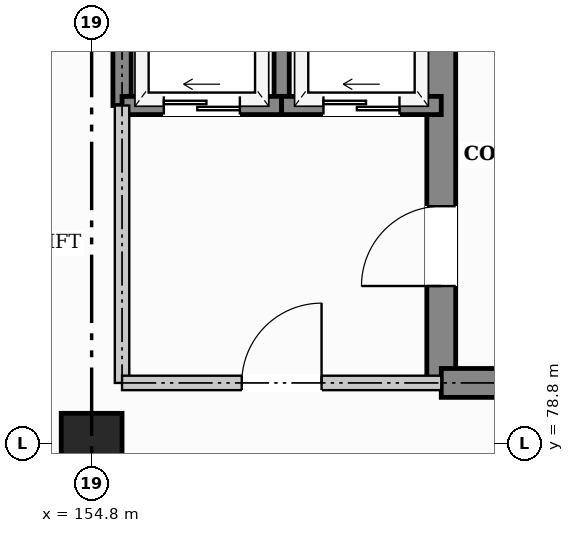
"""IFC4 building model, lengths in metres.
Left out: names, types, materials, properties, quantities, classifications, styles, units other than length and angle.
Written with IfcOpenShell. Run it as: python <this file> out.ifc"""

import sys

from ifc_helpers import new_model, si_unit, direction, frame, frame_2d, origin, origin_2d, place, context, subcontext, project, spatial, rectangle, extrude, element, fill, save


model = new_model("IFC4")
c1 = context("Model", 3, precision=1e-05, world=origin(), true_north=direction((0.0, 1.0)))
c2 = subcontext(c1, "Body", "Model", "MODEL_VIEW")
j1 = project(units=[si_unit("LENGTHUNIT", "METRE"), si_unit("PLANEANGLEUNIT", "RADIAN")], contexts=[c1])
p1 = place(None, origin())
s1 = spatial("IfcSite", under=j1, at=p1, CompositionType="ELEMENT")
p2 = place(p1, origin())
s2 = spatial("IfcBuilding", under=s1, at=p2, CompositionType="ELEMENT")
p3 = place(p2, frame((0.0, 0.0, 9.6)))
s3 = spatial("IfcBuildingStorey", under=s2, at=p3, CompositionType="ELEMENT", Elevation=9.6)
p4 = place(p3, frame((154.8, 78.8, 0.0), z_axis=(0.0, 0.0, 1.0), x_axis=(1.0, 0.0, 0.0)))
e1 = element("IfcColumn", 1, at=p4, inside=s3, PredefinedType="COLUMN", context=c2, shape_type="SweptSolid", body=[
    extrude(rectangle(XDim=0.8, YDim=0.8, at=origin_2d()), origin(), (0.0, 0.0, 1.0), 3.6),
])
p5 = place(p3, frame((159.4, 79.6, 0.0), z_axis=(0.0, 0.0, 1.0), x_axis=(0.0, 1.0, 0.0)))
e2 = element("IfcWall", 2, at=p5, inside=s3, PredefinedType="SHEAR", context=c2, shape_type="SweptSolid", body=[
    extrude(rectangle(XDim=6.0, YDim=0.38, at=frame_2d((3.0, 0.0))), origin(), (0.0, 0.0, 1.0), 3.32),
])
p6 = place(p5, frame((1.275, 0.0, 0.0)))
e3 = element("IfcOpeningElement", 3, at=p6, cuts=e2, PredefinedType="OPENING", context=c2, shape_type="SweptSolid", body=[
    extrude(rectangle(XDim=1.05, YDim=2.15, at=frame_2d((0.525, 1.075))), frame((0.0, 0.2, 0.0), z_axis=(0.0, -1.0, 0.0), x_axis=(1.0, 0.0, 0.0)), (0.0, 0.0, 1.0), 0.4),
])
p7 = place(p3, frame((159.4, 79.6, 0.0), z_axis=(0.0, 0.0, 1.0), x_axis=(1.0, 0.0, 0.0)))
e4 = element("IfcWall", 4, at=p7, inside=s3, PredefinedType="SHEAR", context=c2, shape_type="SweptSolid", body=[
    extrude(rectangle(XDim=7.0, YDim=0.38, at=frame_2d((3.5, 0.0))), origin(), (0.0, 0.0, 1.0), 3.32),
])
p8 = place(p3, frame((155.2, 83.25, 0.0), z_axis=(0.0, 0.0, 1.0), x_axis=(0.0, 1.0, 0.0)))
e5 = element("IfcWall", 5, at=p8, inside=s3, PredefinedType="SHEAR", context=c2, shape_type="SweptSolid", body=[
    extrude(rectangle(XDim=2.35, YDim=0.24, at=frame_2d((1.175, 0.0))), origin(), (0.0, 0.0, 1.0), 3.32),
])
p9 = place(p3, frame((157.3, 83.25, 0.0), z_axis=(0.0, 0.0, 1.0), x_axis=(0.0, 1.0, 0.0)))
e6 = element("IfcWall", 6, at=p9, inside=s3, PredefinedType="SHEAR", context=c2, shape_type="SweptSolid", body=[
    extrude(rectangle(XDim=2.35, YDim=0.2, at=frame_2d((1.175, 0.0))), origin(), (0.0, 0.0, 1.0), 3.32),
])
p10 = place(p3, frame((155.2, 83.25, 0.0), z_axis=(0.0, 0.0, 1.0), x_axis=(1.0, 0.0, 0.0)))
e7 = element("IfcWall", 7, at=p10, inside=s3, PredefinedType="SHEAR", context=c2, shape_type="SweptSolid", body=[
    extrude(rectangle(XDim=2.1, YDim=0.24, at=frame_2d((1.05, 0.0))), origin(), (0.0, 0.0, 1.0), 3.32),
])
p11 = place(p10, frame((0.55, 0.0, 0.0)))
e8 = element("IfcOpeningElement", 8, at=p11, cuts=e7, PredefinedType="OPENING", context=c2, shape_type="SweptSolid", body=[
    extrude(rectangle(XDim=1.0, YDim=2.1, at=frame_2d((0.5, 1.05))), frame((0.0, 0.13, 0.0), z_axis=(0.0, -1.0, 0.0), x_axis=(1.0, 0.0, 0.0)), (0.0, 0.0, 1.0), 0.26),
])
p12 = place(p3, frame((157.3, 83.25, 0.0), z_axis=(0.0, 0.0, 1.0), x_axis=(1.0, 0.0, 0.0)))
e9 = element("IfcWall", 9, at=p12, inside=s3, PredefinedType="SHEAR", context=c2, shape_type="SweptSolid", body=[
    extrude(rectangle(XDim=2.1, YDim=0.24, at=frame_2d((1.05, 0.0))), origin(), (0.0, 0.0, 1.0), 3.32),
])
p13 = place(p12, frame((0.55, 0.0, 0.0)))
e10 = element("IfcOpeningElement", 10, at=p13, cuts=e9, PredefinedType="OPENING", context=c2, shape_type="SweptSolid", body=[
    extrude(rectangle(XDim=1.0, YDim=2.1, at=frame_2d((0.5, 1.05))), frame((0.0, 0.13, 0.0), z_axis=(0.0, -1.0, 0.0), x_axis=(1.0, 0.0, 0.0)), (0.0, 0.0, 1.0), 0.26),
])
p14 = place(p3, frame((155.2, 79.6, 0.0), z_axis=(0.0, 0.0, 1.0), x_axis=(0.0, 1.0, 0.0)))
e11 = element("IfcWall", 11, at=p14, inside=s3, PredefinedType="PARTITIONING", context=c2, shape_type="SweptSolid", body=[
    extrude(rectangle(XDim=3.65, YDim=0.19, at=frame_2d((1.825, 0.0))), origin(), (0.0, 0.0, 1.0), 3.32),
])
p15 = place(p3, frame((155.2, 79.6, 0.0), z_axis=(0.0, 0.0, 1.0), x_axis=(1.0, 0.0, 0.0)))
e12 = element("IfcWall", 12, at=p15, inside=s3, PredefinedType="PARTITIONING", context=c2, shape_type="SweptSolid", body=[
    extrude(rectangle(XDim=4.2, YDim=0.19, at=frame_2d((2.1, 0.0))), origin(), (0.0, 0.0, 1.0), 3.32),
])
p16 = place(p15, frame((1.575, 0.0, 0.0)))
e13 = element("IfcOpeningElement", 13, at=p16, cuts=e12, PredefinedType="OPENING", context=c2, shape_type="SweptSolid", body=[
    extrude(rectangle(XDim=1.05, YDim=2.15, at=frame_2d((0.525, 1.075))), frame((0.0, 0.105, 0.0), z_axis=(0.0, -1.0, 0.0), x_axis=(1.0, 0.0, 0.0)), (0.0, 0.0, 1.0), 0.21),
])
p17 = place(p6, origin())
e14 = element("IfcDoor", 14, at=p17, inside=s3, OperationType="SINGLE_SWING_LEFT", PredefinedType="DOOR", context=c2, shape_type="SweptSolid", body=[
    extrude(rectangle(XDim=1.05, YDim=2.15, at=frame_2d((0.525, 1.075))), frame((0.0, 0.025, 0.0), z_axis=(0.0, -1.0, 0.0), x_axis=(1.0, 0.0, 0.0)), (0.0, 0.0, 1.0), 0.05),
])
fill(e3, e14)
p18 = place(p11, origin())
e15 = element("IfcDoor", 15, at=p18, inside=s3, OperationType="SLIDING_TO_LEFT", PredefinedType="DOOR", context=c2, shape_type="SweptSolid", body=[
    extrude(rectangle(XDim=1.0, YDim=2.1, at=frame_2d((0.5, 1.05))), frame((0.0, 0.025, 0.0), z_axis=(0.0, -1.0, 0.0), x_axis=(1.0, 0.0, 0.0)), (0.0, 0.0, 1.0), 0.05),
])
fill(e8, e15)
p19 = place(p13, origin())
e16 = element("IfcDoor", 16, at=p19, inside=s3, OperationType="SLIDING_TO_LEFT", PredefinedType="DOOR", context=c2, shape_type="SweptSolid", body=[
    extrude(rectangle(XDim=1.0, YDim=2.1, at=frame_2d((0.5, 1.05))), frame((0.0, 0.025, 0.0), z_axis=(0.0, -1.0, 0.0), x_axis=(1.0, 0.0, 0.0)), (0.0, 0.0, 1.0), 0.05),
])
fill(e10, e16)
p20 = place(p16, origin())
e17 = element("IfcDoor", 17, at=p20, inside=s3, OperationType="SINGLE_SWING_RIGHT", PredefinedType="DOOR", context=c2, shape_type="SweptSolid", body=[
    extrude(rectangle(XDim=1.05, YDim=2.15, at=frame_2d((0.525, 1.075))), frame((0.0, 0.025, 0.0), z_axis=(0.0, -1.0, 0.0), x_axis=(1.0, 0.0, 0.0)), (0.0, 0.0, 1.0), 0.05),
])
fill(e13, e17)
save(model, sys.argv[1])
